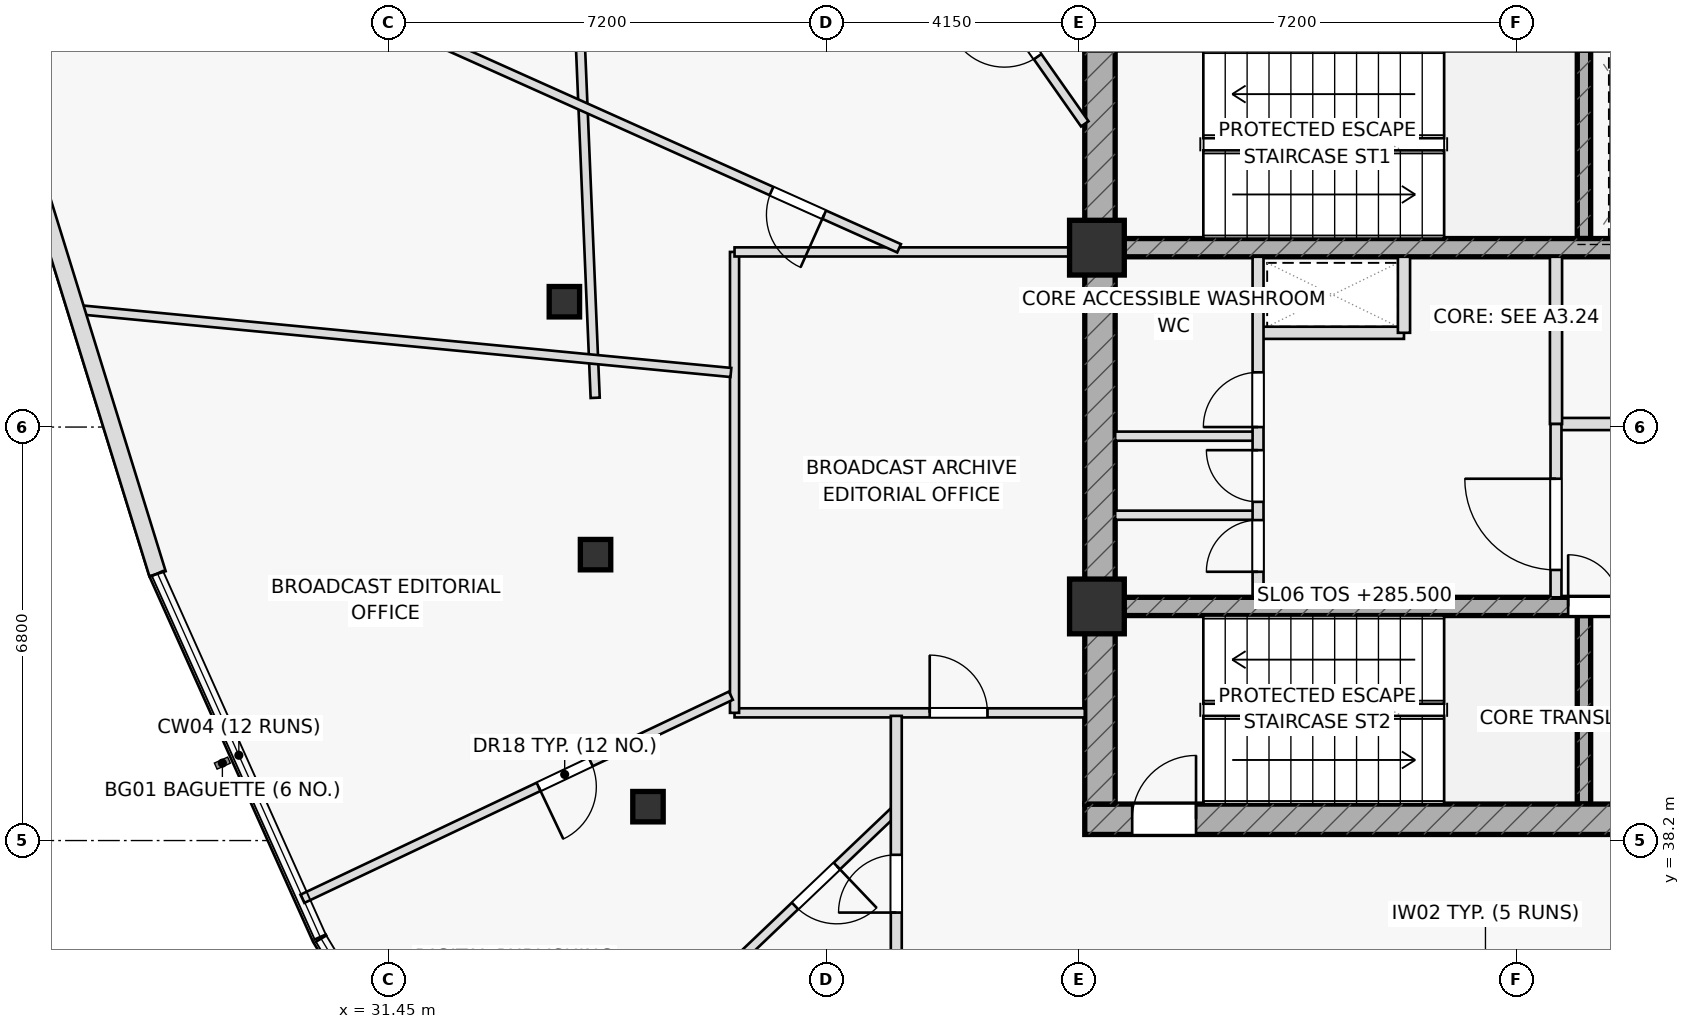
"""IFC4 building model, lengths in metres.
Left out: names, types, materials, properties, quantities, classifications, styles, units other than length and angle.
Written with IfcOpenShell. Run it as: python <this file> out.ifc"""

import sys

from ifc_helpers import new_model, si_unit, direction, frame, frame_2d, origin, origin_2d, place, context, subcontext, project, spatial, rectangle, hollow_rectangle, extrude, element, fill, save


model = new_model("IFC4")
c1 = context("Model", 3, precision=1e-05, world=origin(), true_north=direction((0.0, 1.0)))
c2 = subcontext(c1, "Body", "Model", "MODEL_VIEW")
j1 = project(units=[si_unit("LENGTHUNIT", "METRE"), si_unit("PLANEANGLEUNIT", "RADIAN")], contexts=[c1])
p1 = place(None, origin())
s1 = spatial("IfcSite", under=j1, at=p1, CompositionType="ELEMENT")
p2 = place(p1, origin())
s2 = spatial("IfcBuilding", under=s1, at=p2, CompositionType="ELEMENT")
p3 = place(p2, frame((0.0, 0.0, 285.5)))
s3 = spatial("IfcBuildingStorey", under=s2, at=p3, CompositionType="ELEMENT", Elevation=285.5)
for number, where, z_axis, x_axis in (
    (1, (51.11, 48.1, 0.0), (0.0, 0.0, 1.0), (0.0, 1.0, 0.0)),
    (2, (51.11, 38.8, 0.0), (0.0, 0.0, 1.0), (0.0, 1.0, 0.0)),
):
    element("IfcWall", number, at=place(p3, frame(where, z_axis=z_axis, x_axis=x_axis)), inside=s3, PredefinedType="SHEAR", context=c2, shape_type="SweptSolid", body=[
        extrude(rectangle(XDim=3.1, YDim=0.22, at=frame_2d((1.55, 0.0))), origin(), (0.0, 0.0, 1.0), 3.7),
    ])
p4 = place(p3, frame((42.9, 38.55, 0.0), z_axis=(0.0, 0.0, 1.0), x_axis=(1.0, 0.0, 0.0)))
e3 = element("IfcWall", 3, at=p4, inside=s3, PredefinedType="SHEAR", context=c2, shape_type="SweptSolid", body=[
    extrude(rectangle(XDim=14.2, YDim=0.5, at=frame_2d((7.1, 0.0))), origin(), (0.0, 0.0, 1.0), 3.7),
])
p5 = place(p4, frame((0.78, 0.0, 0.0)))
e4 = element("IfcOpeningElement", 4, at=p5, cuts=e3, PredefinedType="OPENING", context=c2, shape_type="SweptSolid", body=[
    extrude(rectangle(XDim=1.05, YDim=2.2, at=frame_2d((0.525, 1.1))), frame((0.0, 0.26, 0.0), z_axis=(0.0, -1.0, 0.0), x_axis=(1.0, 0.0, 0.0)), (0.0, 0.0, 1.0), 0.52),
])
p6 = place(p3, frame((43.15, 38.8, 0.0), z_axis=(0.0, 0.0, 1.0), x_axis=(0.0, 1.0, 0.0)))
e5 = element("IfcWall", 5, at=p6, inside=s3, PredefinedType="SHEAR", context=c2, shape_type="SweptSolid", body=[
    extrude(rectangle(XDim=12.4, YDim=0.5, at=frame_2d((6.2, 0.0))), origin(), (0.0, 0.0, 1.0), 3.7),
])
p7 = place(p3, frame((43.4, 47.95, 0.0), z_axis=(0.0, 0.0, 1.0), x_axis=(1.0, 0.0, 0.0)))
e6 = element("IfcWall", 6, at=p7, inside=s3, PredefinedType="SHEAR", context=c2, shape_type="SweptSolid", body=[
    extrude(rectangle(XDim=13.2, YDim=0.3, at=frame_2d((6.6, 0.0))), origin(), (0.0, 0.0, 1.0), 3.7),
])
p8 = place(p7, frame((8.345, 0.0, 0.0)))
e7 = element("IfcOpeningElement", 7, at=p8, cuts=e6, PredefinedType="OPENING", context=c2, shape_type="SweptSolid", body=[
    extrude(rectangle(XDim=1.15, YDim=2.2, at=frame_2d((0.575, 1.1))), frame((0.0, 0.16, 0.0), z_axis=(0.0, -1.0, 0.0), x_axis=(1.0, 0.0, 0.0)), (0.0, 0.0, 1.0), 0.32),
])
p9 = place(p7, frame((10.065, 0.0, 0.0)))
e8 = element("IfcOpeningElement", 8, at=p9, cuts=e6, PredefinedType="OPENING", context=c2, shape_type="SweptSolid", body=[
    extrude(rectangle(XDim=1.15, YDim=2.2, at=frame_2d((0.575, 1.1))), frame((0.0, 0.16, 0.0), z_axis=(0.0, -1.0, 0.0), x_axis=(1.0, 0.0, 0.0)), (0.0, 0.0, 1.0), 0.32),
])
p10 = place(p7, frame((11.645, 0.0, 0.0)))
e9 = element("IfcOpeningElement", 9, at=p10, cuts=e6, PredefinedType="OPENING", context=c2, shape_type="SweptSolid", body=[
    extrude(rectangle(XDim=1.15, YDim=2.2, at=frame_2d((0.575, 1.1))), frame((0.0, 0.16, 0.0), z_axis=(0.0, -1.0, 0.0), x_axis=(1.0, 0.0, 0.0)), (0.0, 0.0, 1.0), 0.32),
])
p11 = place(p3, frame((43.4, 42.05, 0.0), z_axis=(0.0, 0.0, 1.0), x_axis=(1.0, 0.0, 0.0)))
e10 = element("IfcWall", 10, at=p11, inside=s3, PredefinedType="SHEAR", context=c2, shape_type="SweptSolid", body=[
    extrude(rectangle(XDim=13.2, YDim=0.3, at=frame_2d((6.6, 0.0))), origin(), (0.0, 0.0, 1.0), 3.7),
])
p12 = place(p11, frame((7.45, 0.0, 0.0)))
e11 = element("IfcOpeningElement", 11, at=p12, cuts=e10, PredefinedType="OPENING", context=c2, shape_type="SweptSolid", body=[
    extrude(rectangle(XDim=0.85, YDim=2.05, at=frame_2d((0.425, 1.025))), frame((0.0, 0.16, 0.0), z_axis=(0.0, -1.0, 0.0), x_axis=(1.0, 0.0, 0.0)), (0.0, 0.0, 1.0), 0.32),
])
p13 = place(p11, frame((9.5, 0.0, 0.0)))
e12 = element("IfcOpeningElement", 12, at=p13, cuts=e10, PredefinedType="OPENING", context=c2, shape_type="SweptSolid", body=[
    extrude(rectangle(XDim=0.85, YDim=2.05, at=frame_2d((0.425, 1.025))), frame((0.0, 0.16, 0.0), z_axis=(0.0, -1.0, 0.0), x_axis=(1.0, 0.0, 0.0)), (0.0, 0.0, 1.0), 0.32),
])
p14 = place(p11, frame((11.6, 0.0, 0.0)))
e13 = element("IfcOpeningElement", 13, at=p14, cuts=e10, PredefinedType="OPENING", context=c2, shape_type="SweptSolid", body=[
    extrude(rectangle(XDim=0.85, YDim=2.05, at=frame_2d((0.425, 1.025))), frame((0.0, 0.16, 0.0), z_axis=(0.0, -1.0, 0.0), x_axis=(1.0, 0.0, 0.0)), (0.0, 0.0, 1.0), 0.32),
])
for number, where, z_axis, x_axis in (
    (14, (43.1, 47.95, 0.0), (0.0, 0.0, 1.0), (1.0, 0.0, 0.0)),
    (15, (43.1, 42.05, 0.0), (0.0, 0.0, 1.0), (1.0, 0.0, 0.0)),
):
    element("IfcColumn", number, at=place(p3, frame(where, z_axis=z_axis, x_axis=x_axis)), inside=s3, PredefinedType="COLUMN", context=c2, shape_type="SweptSolid", body=[
        extrude(rectangle(XDim=0.9, YDim=0.9, at=origin_2d()), origin(), (0.0, 0.0, 1.0), 3.7),
    ])
for number, where, z_axis, x_axis in (
    (16, (34.342, 47.061, 0.0), (0.0, 0.0, 1.0), (1.0, 0.0, 0.0)),
    (17, (34.854, 42.902, 0.0), (0.0, 0.0, 1.0), (1.0, 0.0, 0.0)),
    (18, (35.717, 38.757, 0.0), (0.0, 0.0, 1.0), (1.0, 0.0, 0.0)),
):
    element("IfcColumn", number, at=place(p3, frame(where, z_axis=z_axis, x_axis=x_axis)), inside=s3, PredefinedType="COLUMN", context=c2, shape_type="SweptSolid", body=[
        extrude(hollow_rectangle(XDim=0.5, YDim=0.5, WallThickness=0.03, at=origin_2d()), origin(), (0.0, 0.0, 1.0), 3.7),
    ])
p15 = place(p3, frame((45.75, 46.55, 0.0), z_axis=(0.0, 0.0, 1.0), x_axis=(1.0, 0.0, 0.0)))
e19 = element("IfcWall", 19, at=p15, inside=s3, PredefinedType="PARTITIONING", context=c2, shape_type="SweptSolid", body=[
    extrude(rectangle(XDim=2.4, YDim=0.2, at=frame_2d((1.2, 0.0))), origin(), (0.0, 0.0, 1.0), 3.7),
])
p16 = place(p3, frame((48.15, 46.55, 0.0), z_axis=(0.0, 0.0, 1.0), x_axis=(0.0, 1.0, 0.0)))
e20 = element("IfcWall", 20, at=p16, inside=s3, PredefinedType="PARTITIONING", context=c2, shape_type="SweptSolid", body=[
    extrude(rectangle(XDim=1.25, YDim=0.2, at=frame_2d((0.625, 0.0))), origin(), (0.0, 0.0, 1.0), 3.7),
])
p17 = place(p3, frame((50.65, 45.05, 0.0), z_axis=(0.0, 0.0, 1.0), x_axis=(1.0, 0.0, 0.0)))
e21 = element("IfcWall", 21, at=p17, inside=s3, PredefinedType="PARTITIONING", context=c2, shape_type="SweptSolid", body=[
    extrude(rectangle(XDim=5.95, YDim=0.2, at=frame_2d((2.975, 0.0))), origin(), (0.0, 0.0, 1.0), 3.7),
])
p18 = place(p17, frame((1.35, 0.0, 0.0)))
e22 = element("IfcOpeningElement", 22, at=p18, cuts=e21, PredefinedType="OPENING", context=c2, shape_type="SweptSolid", body=[
    extrude(rectangle(XDim=1.5, YDim=2.2, at=frame_2d((0.75, 1.1))), frame((0.0, 0.11, 0.0), z_axis=(0.0, -1.0, 0.0), x_axis=(1.0, 0.0, 0.0)), (0.0, 0.0, 1.0), 0.22),
])
p19 = place(p3, frame((50.65, 45.05, 0.0), z_axis=(0.0, 0.0, 1.0), x_axis=(0.0, 1.0, 0.0)))
e23 = element("IfcWall", 23, at=p19, inside=s3, PredefinedType="PARTITIONING", context=c2, shape_type="SweptSolid", body=[
    extrude(rectangle(XDim=2.75, YDim=0.2, at=frame_2d((1.375, 0.0))), origin(), (0.0, 0.0, 1.0), 3.7),
])
p20 = place(p3, frame((50.65, 42.2, 0.0), z_axis=(0.0, 0.0, 1.0), x_axis=(0.0, 1.0, 0.0)))
e24 = element("IfcWall", 24, at=p20, inside=s3, PredefinedType="PARTITIONING", context=c2, shape_type="SweptSolid", body=[
    extrude(rectangle(XDim=2.85, YDim=0.18, at=frame_2d((1.425, 0.0))), origin(), (0.0, 0.0, 1.0), 3.7),
])
p21 = place(p20, frame((0.45, 0.0, 0.0)))
e25 = element("IfcOpeningElement", 25, at=p21, cuts=e24, PredefinedType="OPENING", context=c2, shape_type="SweptSolid", body=[
    extrude(rectangle(XDim=1.5, YDim=2.2, at=frame_2d((0.75, 1.1))), frame((0.0, 0.1, 0.0), z_axis=(0.0, -1.0, 0.0), x_axis=(1.0, 0.0, 0.0)), (0.0, 0.0, 1.0), 0.2),
])
for number, where, z_axis, x_axis in (
    (26, (43.4, 43.55, 0.0), (0.0, 0.0, 1.0), (1.0, 0.0, 0.0)),
    (27, (43.4, 44.85, 0.0), (0.0, 0.0, 1.0), (1.0, 0.0, 0.0)),
):
    element("IfcWall", number, at=place(p3, frame(where, z_axis=z_axis, x_axis=x_axis)), inside=s3, PredefinedType="PARTITIONING", context=c2, shape_type="SweptSolid", body=[
        extrude(rectangle(XDim=2.35, YDim=0.15, at=frame_2d((1.175, 0.0))), origin(), (0.0, 0.0, 1.0), 3.7),
    ])
p22 = place(p3, frame((45.75, 42.2, 0.0), z_axis=(0.0, 0.0, 1.0), x_axis=(0.0, 1.0, 0.0)))
e28 = element("IfcWall", 28, at=p22, inside=s3, PredefinedType="PARTITIONING", context=c2, shape_type="SweptSolid", body=[
    extrude(rectangle(XDim=5.6, YDim=0.18, at=frame_2d((2.8, 0.0))), origin(), (0.0, 0.0, 1.0), 3.7),
])
p23 = place(p22, frame((0.42, 0.0, 0.0)))
e29 = element("IfcOpeningElement", 29, at=p23, cuts=e28, PredefinedType="OPENING", context=c2, shape_type="SweptSolid", body=[
    extrude(rectangle(XDim=0.85, YDim=2.05, at=frame_2d((0.425, 1.025))), frame((0.0, 0.1, 0.0), z_axis=(0.0, -1.0, 0.0), x_axis=(1.0, 0.0, 0.0)), (0.0, 0.0, 1.0), 0.2),
])
p24 = place(p22, frame((1.57, 0.0, 0.0)))
e30 = element("IfcOpeningElement", 30, at=p24, cuts=e28, PredefinedType="OPENING", context=c2, shape_type="SweptSolid", body=[
    extrude(rectangle(XDim=0.85, YDim=2.05, at=frame_2d((0.425, 1.025))), frame((0.0, 0.1, 0.0), z_axis=(0.0, -1.0, 0.0), x_axis=(1.0, 0.0, 0.0)), (0.0, 0.0, 1.0), 0.2),
])
p25 = place(p22, frame((2.8, 0.0, 0.0)))
e31 = element("IfcOpeningElement", 31, at=p25, cuts=e28, PredefinedType="OPENING", context=c2, shape_type="SweptSolid", body=[
    extrude(rectangle(XDim=0.9, YDim=2.05, at=frame_2d((0.45, 1.025))), frame((0.0, 0.1, 0.0), z_axis=(0.0, -1.0, 0.0), x_axis=(1.0, 0.0, 0.0)), (0.0, 0.0, 1.0), 0.2),
])
p26 = place(p3, frame((34.507, 53.613, 0.0), z_axis=(0.0, 0.0, 1.0), x_axis=(0.041875090182, -0.999122853718, 0.0)))
e32 = element("IfcWall", 32, at=p26, inside=s3, PredefinedType="PARTITIONING", context=c2, shape_type="SweptSolid", body=[
    extrude(rectangle(XDim=8.139, YDim=0.15, at=frame_2d((4.069, 0.0))), origin(), (0.0, 0.0, 1.0), 3.235),
])
p27 = place(p3, frame((37.14, 40.3, 0.0), z_axis=(0.0, 0.0, 1.0), x_axis=(1.0, 0.0, 0.0)))
e33 = element("IfcWall", 33, at=p27, inside=s3, PredefinedType="PARTITIONING", context=c2, shape_type="SweptSolid", body=[
    extrude(rectangle(XDim=5.76, YDim=0.15, at=frame_2d((2.88, 0.0))), origin(), (0.0, 0.0, 1.0), 3.175),
])
p28 = place(p27, frame((3.21, 0.0, 0.0)))
e34 = element("IfcOpeningElement", 34, at=p28, cuts=e33, PredefinedType="OPENING", context=c2, shape_type="SweptSolid", body=[
    extrude(rectangle(XDim=0.95, YDim=2.05, at=frame_2d((0.475, 1.025))), frame((0.0, 0.085, 0.0), z_axis=(0.0, -1.0, 0.0), x_axis=(1.0, 0.0, 0.0)), (0.0, 0.0, 1.0), 0.17),
])
p29 = place(p3, frame((37.14, 40.3, 0.0), z_axis=(0.0, 0.0, 1.0), x_axis=(0.0, 1.0, 0.0)))
e35 = element("IfcWall", 35, at=p29, inside=s3, PredefinedType="PARTITIONING", context=c2, shape_type="SweptSolid", body=[
    extrude(rectangle(XDim=7.58, YDim=0.15, at=frame_2d((3.79, 0.0))), origin(), (0.0, 0.0, 1.0), 3.7),
])
p30 = place(p3, frame((37.14, 47.88, 0.0), z_axis=(0.0, 0.0, 1.0), x_axis=(1.0, 0.0, 0.0)))
e36 = element("IfcWall", 36, at=p30, inside=s3, PredefinedType="PARTITIONING", context=c2, shape_type="SweptSolid", body=[
    extrude(rectangle(XDim=5.76, YDim=0.15, at=frame_2d((2.88, 0.0))), origin(), (0.0, 0.0, 1.0), 3.7),
])
p31 = place(p3, frame((37.08, 45.897, 0.0), z_axis=(0.0, 0.0, 1.0), x_axis=(-0.995396799969, 0.095839504443, 0.0)))
e37 = element("IfcWall", 37, at=p31, inside=s3, PredefinedType="PARTITIONING", context=c2, shape_type="SweptSolid", body=[
    extrude(rectangle(XDim=10.834, YDim=0.15, at=frame_2d((5.417, 0.0))), origin(), (0.0, 0.0, 1.0), 3.235),
])
p32 = place(p3, frame((37.08, 40.583, 0.0), z_axis=(0.0, 0.0, 1.0), x_axis=(-0.903622418397, -0.428329925372, 0.0)))
e38 = element("IfcWall", 38, at=p32, inside=s3, PredefinedType="PARTITIONING", context=c2, shape_type="SweptSolid", body=[
    extrude(rectangle(XDim=7.798, YDim=0.15, at=frame_2d((3.899, 0.0))), origin(), (0.0, 0.0, 1.0), 3.235),
])
p33 = place(p32, frame((2.55, 0.0, 0.0)))
e39 = element("IfcOpeningElement", 39, at=p33, cuts=e38, PredefinedType="OPENING", context=c2, shape_type="SweptSolid", body=[
    extrude(rectangle(XDim=0.95, YDim=2.05, at=frame_2d((0.475, 1.025))), frame((0.0, 0.085, 0.0), z_axis=(0.0, -1.0, 0.0), x_axis=(1.0, 0.0, 0.0)), (0.0, 0.0, 1.0), 0.17),
])
p34 = place(p3, frame((39.8, 38.712, 0.0), z_axis=(0.0, 0.0, 1.0), x_axis=(-0.723993287643, -0.68980701609, 0.0)))
e40 = element("IfcWall", 40, at=p34, inside=s3, PredefinedType="PARTITIONING", context=c2, shape_type="SweptSolid", body=[
    extrude(rectangle(XDim=9.434, YDim=0.15, at=frame_2d((4.717, 0.0))), origin(), (0.0, 0.0, 1.0), 3.235),
])
p35 = place(p34, frame((1.35, 0.0, 0.0)))
e41 = element("IfcOpeningElement", 41, at=p35, cuts=e40, PredefinedType="OPENING", context=c2, shape_type="SweptSolid", body=[
    extrude(rectangle(XDim=0.95, YDim=2.05, at=frame_2d((0.475, 1.025))), frame((0.0, 0.085, 0.0), z_axis=(0.0, -1.0, 0.0), x_axis=(1.0, 0.0, 0.0)), (0.0, 0.0, 1.0), 0.17),
])
p36 = place(p3, frame((42.9, 49.986, 0.0), z_axis=(0.0, 0.0, 1.0), x_axis=(-0.574534288992, 0.818480513373, 0.0)))
e42 = element("IfcWall", 42, at=p36, inside=s3, PredefinedType="PARTITIONING", context=c2, shape_type="SweptSolid", body=[
    extrude(rectangle(XDim=14.912, YDim=0.15, at=frame_2d((7.456, 0.0))), origin(), (0.0, 0.0, 1.0), 3.175),
])
p37 = place(p36, frame((1.35, 0.0, 0.0)))
e43 = element("IfcOpeningElement", 43, at=p37, cuts=e42, PredefinedType="OPENING", context=c2, shape_type="SweptSolid", body=[
    extrude(rectangle(XDim=0.95, YDim=2.05, at=frame_2d((0.475, 1.025))), frame((0.0, 0.085, 0.0), z_axis=(0.0, -1.0, 0.0), x_axis=(1.0, 0.0, 0.0)), (0.0, 0.0, 1.0), 0.17),
])
p38 = place(p3, frame((39.846, 47.94, 0.0), z_axis=(0.0, 0.0, 1.0), x_axis=(-0.912400712577, 0.409298106139, 0.0)))
e44 = element("IfcWall", 44, at=p38, inside=s3, PredefinedType="PARTITIONING", context=c2, shape_type="SweptSolid", body=[
    extrude(rectangle(XDim=16.67, YDim=0.15, at=frame_2d((8.335, 0.0))), origin(), (0.0, 0.0, 1.0), 3.175),
])
p39 = place(p38, frame((1.35, 0.0, 0.0)))
e45 = element("IfcOpeningElement", 45, at=p39, cuts=e44, PredefinedType="OPENING", context=c2, shape_type="SweptSolid", body=[
    extrude(rectangle(XDim=0.95, YDim=2.05, at=frame_2d((0.475, 1.025))), frame((0.0, 0.085, 0.0), z_axis=(0.0, -1.0, 0.0), x_axis=(1.0, 0.0, 0.0)), (0.0, 0.0, 1.0), 0.17),
])
p40 = place(p3, frame((39.8, 36.17, 0.0), z_axis=(0.0, 0.0, 1.0), x_axis=(0.0, 1.0, 0.0)))
e46 = element("IfcWall", 46, at=p40, inside=s3, PredefinedType="PARTITIONING", context=c2, shape_type="SweptSolid", body=[
    extrude(rectangle(XDim=4.08, YDim=0.18, at=frame_2d((2.04, 0.0))), origin(), (0.0, 0.0, 1.0), 3.435),
])
p41 = place(p40, frame((0.845, 0.0, 0.0)))
e47 = element("IfcOpeningElement", 47, at=p41, cuts=e46, PredefinedType="OPENING", context=c2, shape_type="SweptSolid", body=[
    extrude(rectangle(XDim=0.95, YDim=2.05, at=frame_2d((0.475, 1.025))), frame((0.0, 0.1, 0.0), z_axis=(0.0, -1.0, 0.0), x_axis=(1.0, 0.0, 0.0)), (0.0, 0.0, 1.0), 0.2),
])
p42 = place(p3, frame((25.706, 48.878, 0.0), z_axis=(0.0, 0.0, 1.0), x_axis=(0.295281654046, -0.955410249466, 0.0)))
e48 = element("IfcWall", 48, at=p42, inside=s3, PredefinedType="STANDARD", context=c2, shape_type="SweptSolid", body=[
    extrude(rectangle(XDim=6.584, YDim=0.28, at=frame_2d((3.292, 0.0))), origin(), (0.0, 0.0, 1.0), 3.7),
])
p43 = place(p5, origin())
e49 = element("IfcDoor", 49, at=p43, inside=s3, OperationType="SINGLE_SWING_RIGHT", PredefinedType="DOOR", context=c2, shape_type="SweptSolid", body=[
    extrude(rectangle(XDim=1.05, YDim=2.2, at=frame_2d((0.525, 1.1))), frame((0.0, 0.025, 0.0), z_axis=(0.0, -1.0, 0.0), x_axis=(1.0, 0.0, 0.0)), (0.0, 0.0, 1.0), 0.05),
])
fill(e4, e49)
p44 = place(p21, origin())
e50 = element("IfcDoor", 50, at=p44, inside=s3, OperationType="SINGLE_SWING_RIGHT", PredefinedType="DOOR", context=c2, shape_type="SweptSolid", body=[
    extrude(rectangle(XDim=1.5, YDim=2.2, at=frame_2d((0.75, 1.1))), frame((0.0, 0.025, 0.0), z_axis=(0.0, -1.0, 0.0), x_axis=(1.0, 0.0, 0.0)), (0.0, 0.0, 1.0), 0.05),
])
fill(e25, e50)
p45 = place(p12, origin())
e51 = element("IfcDoor", 51, at=p45, inside=s3, OperationType="SINGLE_SWING_LEFT", PredefinedType="DOOR", context=c2, shape_type="SweptSolid", body=[
    extrude(rectangle(XDim=0.85, YDim=2.05, at=frame_2d((0.425, 1.025))), frame((0.0, 0.025, 0.0), z_axis=(0.0, -1.0, 0.0), x_axis=(1.0, 0.0, 0.0)), (0.0, 0.0, 1.0), 0.05),
])
fill(e11, e51)
p46 = place(p23, origin())
e52 = element("IfcDoor", 52, at=p46, inside=s3, OperationType="SINGLE_SWING_LEFT", PredefinedType="DOOR", context=c2, shape_type="SweptSolid", body=[
    extrude(rectangle(XDim=0.85, YDim=2.05, at=frame_2d((0.425, 1.025))), frame((0.0, 0.025, 0.0), z_axis=(0.0, -1.0, 0.0), x_axis=(1.0, 0.0, 0.0)), (0.0, 0.0, 1.0), 0.05),
])
fill(e29, e52)
p47 = place(p24, origin())
e53 = element("IfcDoor", 53, at=p47, inside=s3, OperationType="SINGLE_SWING_RIGHT", PredefinedType="DOOR", context=c2, shape_type="SweptSolid", body=[
    extrude(rectangle(XDim=0.85, YDim=2.05, at=frame_2d((0.425, 1.025))), frame((0.0, 0.025, 0.0), z_axis=(0.0, -1.0, 0.0), x_axis=(1.0, 0.0, 0.0)), (0.0, 0.0, 1.0), 0.05),
])
fill(e30, e53)
p48 = place(p25, origin())
e54 = element("IfcDoor", 54, at=p48, inside=s3, OperationType="SINGLE_SWING_LEFT", PredefinedType="DOOR", context=c2, shape_type="SweptSolid", body=[
    extrude(rectangle(XDim=0.9, YDim=2.05, at=frame_2d((0.45, 1.025))), frame((0.0, 0.025, 0.0), z_axis=(0.0, -1.0, 0.0), x_axis=(1.0, 0.0, 0.0)), (0.0, 0.0, 1.0), 0.05),
])
fill(e31, e54)
p49 = place(p28, origin())
e55 = element("IfcDoor", 55, at=p49, inside=s3, OperationType="SINGLE_SWING_LEFT", PredefinedType="DOOR", context=c2, shape_type="SweptSolid", body=[
    extrude(rectangle(XDim=0.95, YDim=2.05, at=frame_2d((0.475, 1.025))), frame((0.0, 0.025, 0.0), z_axis=(0.0, -1.0, 0.0), x_axis=(1.0, 0.0, 0.0)), (0.0, 0.0, 1.0), 0.05),
])
fill(e34, e55)
p50 = place(p33, origin())
e56 = element("IfcDoor", 56, at=p50, inside=s3, OperationType="SINGLE_SWING_RIGHT", PredefinedType="DOOR", context=c2, shape_type="SweptSolid", body=[
    extrude(rectangle(XDim=0.95, YDim=2.05, at=frame_2d((0.475, 1.025))), frame((0.0, 0.025, 0.0), z_axis=(0.0, -1.0, 0.0), x_axis=(1.0, 0.0, 0.0)), (0.0, 0.0, 1.0), 0.05),
])
fill(e39, e56)
p51 = place(p35, origin())
e57 = element("IfcDoor", 57, at=p51, inside=s3, OperationType="SINGLE_SWING_LEFT", PredefinedType="DOOR", context=c2, shape_type="SweptSolid", body=[
    extrude(rectangle(XDim=0.95, YDim=2.05, at=frame_2d((0.475, 1.025))), frame((0.0, 0.025, 0.0), z_axis=(0.0, -1.0, 0.0), x_axis=(1.0, 0.0, 0.0)), (0.0, 0.0, 1.0), 0.05),
])
fill(e41, e57)
p52 = place(p37, origin())
e58 = element("IfcDoor", 58, at=p52, inside=s3, OperationType="SINGLE_SWING_RIGHT", PredefinedType="DOOR", context=c2, shape_type="SweptSolid", body=[
    extrude(rectangle(XDim=0.95, YDim=2.05, at=frame_2d((0.475, 1.025))), frame((0.0, 0.025, 0.0), z_axis=(0.0, -1.0, 0.0), x_axis=(1.0, 0.0, 0.0)), (0.0, 0.0, 1.0), 0.05),
])
fill(e43, e58)
p53 = place(p39, origin())
e59 = element("IfcDoor", 59, at=p53, inside=s3, OperationType="SINGLE_SWING_LEFT", PredefinedType="DOOR", context=c2, shape_type="SweptSolid", body=[
    extrude(rectangle(XDim=0.95, YDim=2.05, at=frame_2d((0.475, 1.025))), frame((0.0, 0.025, 0.0), z_axis=(0.0, -1.0, 0.0), x_axis=(1.0, 0.0, 0.0)), (0.0, 0.0, 1.0), 0.05),
])
fill(e45, e59)
p54 = place(p41, origin())
e60 = element("IfcDoor", 60, at=p54, inside=s3, OperationType="SINGLE_SWING_LEFT", PredefinedType="DOOR", context=c2, shape_type="SweptSolid", body=[
    extrude(rectangle(XDim=0.95, YDim=2.05, at=frame_2d((0.475, 1.025))), frame((0.0, 0.025, 0.0), z_axis=(0.0, -1.0, 0.0), x_axis=(1.0, 0.0, 0.0)), (0.0, 0.0, 1.0), 0.05),
])
fill(e47, e60)
save(model, sys.argv[1])
